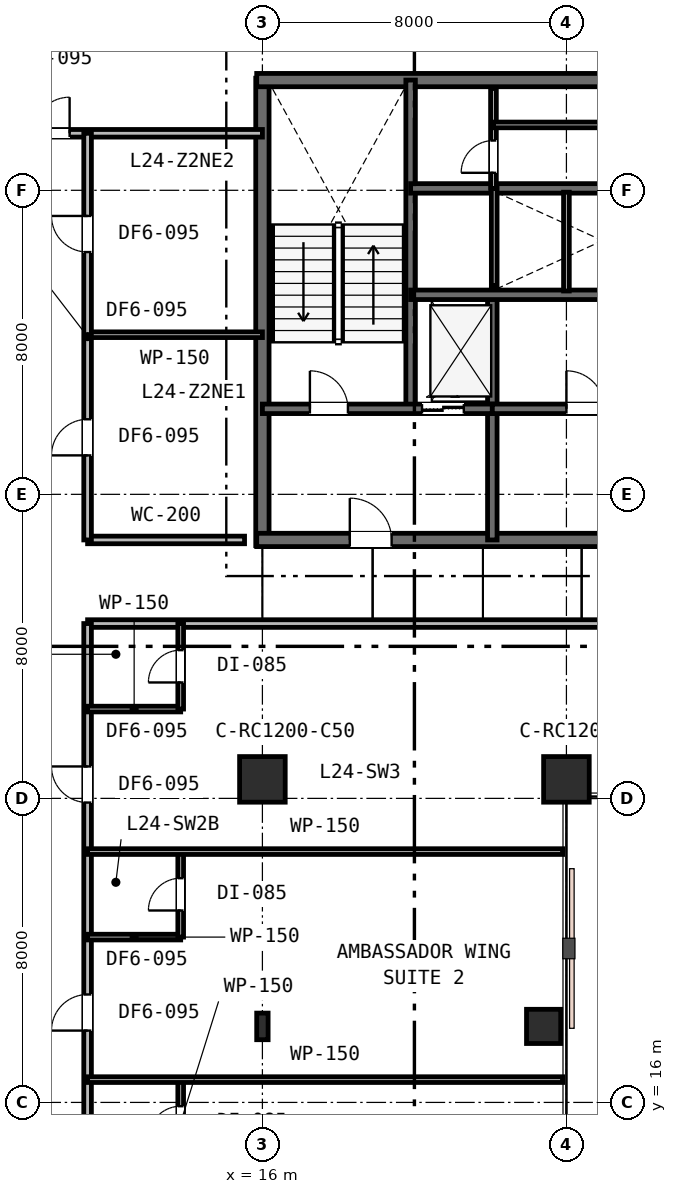
"""IFC4 building model, lengths in metres.
Left out: names, types, materials, properties, quantities, classifications, styles, units other than length and angle.
Written with IfcOpenShell. Run it as: python <this file> out.ifc"""

import sys

from ifc_helpers import new_model, si_unit, direction, frame, frame_2d, origin, origin_2d, place, context, subcontext, project, spatial, rectangle, i_section, extrude, element, fill, save


model = new_model("IFC4")
c1 = context("Model", 3, precision=1e-05, world=origin(), true_north=direction((0.0, 1.0)))
c2 = subcontext(c1, "Body", "Model", "MODEL_VIEW")
j1 = project(units=[si_unit("LENGTHUNIT", "METRE"), si_unit("PLANEANGLEUNIT", "RADIAN")], contexts=[c1])
p1 = place(None, origin())
s1 = spatial("IfcSite", under=j1, at=p1, CompositionType="ELEMENT")
p2 = place(p1, origin())
s2 = spatial("IfcBuilding", under=s1, at=p2, CompositionType="ELEMENT")
p3 = place(p2, frame((0.0, 0.0, 97.2)))
s3 = spatial("IfcBuildingStorey", under=s2, at=p3, CompositionType="ELEMENT", Elevation=97.2)
p4 = place(p3, frame((16.0, 30.65, 0.0), z_axis=(0.0, 0.0, 1.0), x_axis=(0.0, 1.0, 0.0)))
e1 = element("IfcWall", 1, at=p4, inside=s3, PredefinedType="SHEAR", context=c2, shape_type="SweptSolid", body=[
    extrude(rectangle(XDim=12.3, YDim=0.35, at=frame_2d((6.15, 0.0))), origin(), (0.0, 0.0, 1.0), 3.6),
])
p5 = place(p3, frame((15.85, 42.9, 0.0), z_axis=(0.0, 0.0, 1.0), x_axis=(1.0, 0.0, 0.0)))
e2 = element("IfcWall", 2, at=p5, inside=s3, PredefinedType="SHEAR", context=c2, shape_type="SweptSolid", body=[
    extrude(rectangle(XDim=24.3, YDim=0.35, at=frame_2d((12.15, 0.0))), origin(), (0.0, 0.0, 1.0), 3.6),
])
p6 = place(p3, frame((15.85, 30.8, 0.0), z_axis=(0.0, 0.0, 1.0), x_axis=(1.0, 0.0, 0.0)))
e3 = element("IfcWall", 3, at=p6, inside=s3, PredefinedType="SHEAR", context=c2, shape_type="SweptSolid", body=[
    extrude(rectangle(XDim=11.2, YDim=0.35, at=frame_2d((5.6, 0.0))), origin(), (0.0, 0.0, 1.0), 3.6),
])
p7 = place(p6, frame((2.45, 0.0, 0.0)))
e4 = element("IfcOpeningElement", 4, at=p7, cuts=e3, PredefinedType="OPENING", context=c2, shape_type="SweptSolid", body=[
    extrude(rectangle(XDim=1.1, YDim=2.15, at=frame_2d((0.55, 1.075))), frame((0.0, 0.185, 0.0), z_axis=(0.0, -1.0, 0.0), x_axis=(1.0, 0.0, 0.0)), (0.0, 0.0, 1.0), 0.37),
])
p8 = place(p3, frame((19.9, 34.25, 0.0), z_axis=(0.0, 0.0, 1.0), x_axis=(0.0, 1.0, 0.0)))
e5 = element("IfcWall", 5, at=p8, inside=s3, PredefinedType="SHEAR", context=c2, shape_type="SweptSolid", body=[
    extrude(rectangle(XDim=8.65, YDim=0.25, at=frame_2d((4.325, 0.0))), origin(), (0.0, 0.0, 1.0), 3.6),
])
p9 = place(p3, frame((22.05, 30.8, 0.0), z_axis=(0.0, 0.0, 1.0), x_axis=(0.0, 1.0, 0.0)))
e6 = element("IfcWall", 6, at=p9, inside=s3, PredefinedType="SHEAR", context=c2, shape_type="SweptSolid", body=[
    extrude(rectangle(XDim=6.45, YDim=0.25, at=frame_2d((3.225, 0.0))), origin(), (0.0, 0.0, 1.0), 3.6),
])
p10 = place(p3, frame((16.0, 34.25, 0.0), z_axis=(0.0, 0.0, 1.0), x_axis=(1.0, 0.0, 0.0)))
e7 = element("IfcWall", 7, at=p10, inside=s3, PredefinedType="SHEAR", context=c2, shape_type="SweptSolid", body=[
    extrude(rectangle(XDim=6.05, YDim=0.25, at=frame_2d((3.025, 0.0))), origin(), (0.0, 0.0, 1.0), 3.6),
])
p11 = place(p10, frame((1.25, 0.0, 0.0)))
e8 = element("IfcOpeningElement", 8, at=p11, cuts=e7, PredefinedType="OPENING", context=c2, shape_type="SweptSolid", body=[
    extrude(rectangle(XDim=1.0, YDim=2.15, at=frame_2d((0.5, 1.075))), frame((0.0, 0.135, 0.0), z_axis=(0.0, -1.0, 0.0), x_axis=(1.0, 0.0, 0.0)), (0.0, 0.0, 1.0), 0.27),
])
p12 = place(p10, frame((4.2, 0.0, 0.0)))
e9 = element("IfcOpeningElement", 9, at=p12, cuts=e7, PredefinedType="OPENING", context=c2, shape_type="SweptSolid", body=[
    extrude(rectangle(XDim=1.1, YDim=2.15, at=frame_2d((0.55, 1.075))), frame((0.0, 0.135, 0.0), z_axis=(0.0, -1.0, 0.0), x_axis=(1.0, 0.0, 0.0)), (0.0, 0.0, 1.0), 0.27),
])
p13 = place(p3, frame((22.05, 34.25, 0.0), z_axis=(0.0, 0.0, 1.0), x_axis=(1.0, 0.0, 0.0)))
e10 = element("IfcWall", 10, at=p13, inside=s3, PredefinedType="SHEAR", context=c2, shape_type="SweptSolid", body=[
    extrude(rectangle(XDim=5.0, YDim=0.25, at=frame_2d((2.5, 0.0))), origin(), (0.0, 0.0, 1.0), 3.6),
])
p14 = place(p13, frame((1.95, 0.0, 0.0)))
e11 = element("IfcOpeningElement", 11, at=p14, cuts=e10, PredefinedType="OPENING", context=c2, shape_type="SweptSolid", body=[
    extrude(rectangle(XDim=1.0, YDim=2.15, at=frame_2d((0.5, 1.075))), frame((0.0, 0.135, 0.0), z_axis=(0.0, -1.0, 0.0), x_axis=(1.0, 0.0, 0.0)), (0.0, 0.0, 1.0), 0.27),
])
p15 = place(p3, frame((19.9, 37.25, 0.0), z_axis=(0.0, 0.0, 1.0), x_axis=(1.0, 0.0, 0.0)))
e12 = element("IfcWall", 12, at=p15, inside=s3, PredefinedType="SHEAR", context=c2, shape_type="SweptSolid", body=[
    extrude(rectangle(XDim=16.2, YDim=0.25, at=frame_2d((8.1, 0.0))), origin(), (0.0, 0.0, 1.0), 3.6),
])
p16 = place(p15, frame((12.55, 0.0, 0.0)))
e13 = element("IfcOpeningElement", 13, at=p16, cuts=e12, PredefinedType="OPENING", context=c2, shape_type="SweptSolid", body=[
    extrude(rectangle(XDim=0.9, YDim=2.15, at=frame_2d((0.45, 1.075))), frame((0.0, 0.135, 0.0), z_axis=(0.0, -1.0, 0.0), x_axis=(1.0, 0.0, 0.0)), (0.0, 0.0, 1.0), 0.27),
])
p17 = place(p3, frame((19.9, 40.05, 0.0), z_axis=(0.0, 0.0, 1.0), x_axis=(1.0, 0.0, 0.0)))
e14 = element("IfcWall", 14, at=p17, inside=s3, PredefinedType="SHEAR", context=c2, shape_type="SweptSolid", body=[
    extrude(rectangle(XDim=12.05, YDim=0.25, at=frame_2d((6.025, 0.0))), origin(), (0.0, 0.0, 1.0), 3.6),
])
for number, where, z_axis, x_axis in (
    (15, (16.0, 24.5, 0.0), (0.0, 0.0, 1.0), (1.0, 0.0, 0.0)),
    (16, (24.0, 24.5, 0.0), (0.0, 0.0, 1.0), (1.0, 0.0, 0.0)),
):
    element("IfcColumn", number, at=place(p3, frame(where, z_axis=z_axis, x_axis=x_axis)), inside=s3, PredefinedType="COLUMN", context=c2, shape_type="SweptSolid", body=[
        extrude(rectangle(XDim=1.2, YDim=1.2, at=origin_2d()), origin(), (0.0, 0.0, 1.0), 3.6),
    ])
p18 = place(p3, frame((23.4, 18.0, 0.0), z_axis=(0.0, 0.0, 1.0), x_axis=(1.0, 0.0, 0.0)))
e17 = element("IfcColumn", 17, at=p18, inside=s3, PredefinedType="COLUMN", context=c2, shape_type="SweptSolid", body=[
    extrude(rectangle(XDim=0.9, YDim=0.9, at=origin_2d()), origin(), (0.0, 0.0, 1.0), 3.6),
])
p19 = place(p3, frame((16.0, 18.0, 0.0), z_axis=(0.0, 0.0, 1.0), x_axis=(1.0, 0.0, 0.0)))
e18 = element("IfcColumn", 18, at=p19, inside=s3, PredefinedType="COLUMN", context=c2, shape_type="SweptSolid", body=[
    extrude(i_section(OverallWidth=0.3, OverallDepth=0.7, WebThickness=0.017, FlangeThickness=0.032, FilletRadius=0.027, at=origin_2d()), origin(), (0.0, 0.0, 1.0), 3.6),
])
p20 = place(p3, frame((22.1, 37.49, 0.0), z_axis=(0.0, 0.0, 1.0), x_axis=(0.0, 1.0, 0.0)))
e19 = element("IfcWall", 19, at=p20, inside=s3, PredefinedType="PLUMBINGWALL", context=c2, shape_type="SweptSolid", body=[
    extrude(rectangle(XDim=2.56, YDim=0.15, at=frame_2d((1.28, 0.0))), origin(), (0.0, 0.0, 1.0), 3.33),
])
p21 = place(p3, frame((24.0, 37.35, 0.0), z_axis=(0.0, 0.0, 1.0), x_axis=(0.0, 1.0, 0.0)))
e20 = element("IfcWall", 20, at=p21, inside=s3, PredefinedType="PLUMBINGWALL", context=c2, shape_type="SweptSolid", body=[
    extrude(rectangle(XDim=2.6, YDim=0.15, at=frame_2d((1.3, 0.0))), origin(), (0.0, 0.0, 1.0), 3.33),
])
p22 = place(p3, frame((22.08, 40.05, 0.0), z_axis=(0.0, 0.0, 1.0), x_axis=(0.0, 1.0, 0.0)))
e21 = element("IfcWall", 21, at=p22, inside=s3, PredefinedType="PARTITIONING", context=c2, shape_type="SweptSolid", body=[
    extrude(rectangle(XDim=2.63, YDim=0.15, at=frame_2d((1.315, 0.0))), origin(), (0.0, 0.0, 1.0), 3.33),
])
p23 = place(p22, frame((0.41, 0.0, 0.0)))
e22 = element("IfcOpeningElement", 22, at=p23, cuts=e21, PredefinedType="OPENING", context=c2, shape_type="SweptSolid", body=[
    extrude(rectangle(XDim=0.85, YDim=2.15, at=frame_2d((0.425, 1.075))), frame((0.0, 0.085, 0.0), z_axis=(0.0, -1.0, 0.0), x_axis=(1.0, 0.0, 0.0)), (0.0, 0.0, 1.0), 0.17),
])
p24 = place(p3, frame((22.08, 41.72, 0.0), z_axis=(0.0, 0.0, 1.0), x_axis=(1.0, 0.0, 0.0)))
e23 = element("IfcWall", 23, at=p24, inside=s3, PredefinedType="PARTITIONING", context=c2, shape_type="SweptSolid", body=[
    extrude(rectangle(XDim=11.97, YDim=0.15, at=frame_2d((5.985, 0.0))), origin(), (0.0, 0.0, 1.0), 3.33),
])
p25 = place(p24, frame((5.535, 0.0, 0.0)))
e24 = element("IfcOpeningElement", 24, at=p25, cuts=e23, PredefinedType="OPENING", context=c2, shape_type="SweptSolid", body=[
    extrude(rectangle(XDim=0.9, YDim=2.15, at=frame_2d((0.45, 1.075))), frame((0.0, 0.085, 0.0), z_axis=(0.0, -1.0, 0.0), x_axis=(1.0, 0.0, 0.0)), (0.0, 0.0, 1.0), 0.17),
])
p26 = place(p3, frame((11.4, 28.6, 0.0), z_axis=(0.0, 0.0, 1.0), x_axis=(1.0, 0.0, 0.0)))
e25 = element("IfcWall", 25, at=p26, inside=s3, PredefinedType="PARTITIONING", context=c2, shape_type="SweptSolid", body=[
    extrude(rectangle(XDim=32.8, YDim=0.2, at=frame_2d((16.4, 0.0))), origin(), (0.0, 0.0, 1.0), 2.83),
])
p27 = place(p26, frame((14.7, 0.0, 0.0)))
e26 = element("IfcOpeningElement", 26, at=p27, cuts=e25, PredefinedType="OPENING", context=c2, shape_type="SweptSolid", body=[
    extrude(rectangle(XDim=0.95, YDim=2.15, at=frame_2d((0.475, 1.075))), frame((0.0, 0.11, 0.0), z_axis=(0.0, -1.0, 0.0), x_axis=(1.0, 0.0, 0.0)), (0.0, 0.0, 1.0), 0.22),
])
p28 = place(p26, frame((22.475, 0.0, 0.0)))
e27 = element("IfcOpeningElement", 27, at=p28, cuts=e25, PredefinedType="OPENING", context=c2, shape_type="SweptSolid", body=[
    extrude(rectangle(XDim=0.95, YDim=2.15, at=frame_2d((0.475, 1.075))), frame((0.0, 0.11, 0.0), z_axis=(0.0, -1.0, 0.0), x_axis=(1.0, 0.0, 0.0)), (0.0, 0.0, 1.0), 0.22),
])
p29 = place(p26, frame((28.985, 0.0, 0.0)))
e28 = element("IfcOpeningElement", 28, at=p29, cuts=e25, PredefinedType="OPENING", context=c2, shape_type="SweptSolid", body=[
    extrude(rectangle(XDim=0.95, YDim=2.15, at=frame_2d((0.475, 1.075))), frame((0.0, 0.11, 0.0), z_axis=(0.0, -1.0, 0.0), x_axis=(1.0, 0.0, 0.0)), (0.0, 0.0, 1.0), 0.22),
])
p30 = place(p3, frame((11.4, 30.8, 0.0), z_axis=(0.0, 0.0, 1.0), x_axis=(1.0, 0.0, 0.0)))
e29 = element("IfcWall", 29, at=p30, inside=s3, PredefinedType="PARTITIONING", context=c2, shape_type="SweptSolid", body=[
    extrude(rectangle(XDim=4.13, YDim=0.2, at=frame_2d((2.065, 0.0))), origin(), (0.0, 0.0, 1.0), 2.83),
])
p31 = place(p3, frame((0.1, 41.5, 0.0), z_axis=(0.0, 0.0, 1.0), x_axis=(1.0, 0.0, 0.0)))
e30 = element("IfcWall", 30, at=p31, inside=s3, PredefinedType="PARTITIONING", context=c2, shape_type="SweptSolid", body=[
    extrude(rectangle(XDim=15.9, YDim=0.2, at=frame_2d((7.95, 0.0))), origin(), (0.0, 0.0, 1.0), 2.83),
])
p32 = place(p31, frame((9.877, 0.0, 0.0)))
e31 = element("IfcOpeningElement", 31, at=p32, cuts=e30, PredefinedType="OPENING", context=c2, shape_type="SweptSolid", body=[
    extrude(rectangle(XDim=0.95, YDim=2.15, at=frame_2d((0.475, 1.075))), frame((0.0, 0.11, 0.0), z_axis=(0.0, -1.0, 0.0), x_axis=(1.0, 0.0, 0.0)), (0.0, 0.0, 1.0), 0.22),
])
p33 = place(p3, frame((11.4, 36.2, 0.0), z_axis=(0.0, 0.0, 1.0), x_axis=(1.0, 0.0, 0.0)))
e32 = element("IfcWall", 32, at=p33, inside=s3, PredefinedType="PARTITIONING", context=c2, shape_type="SweptSolid", body=[
    extrude(rectangle(XDim=4.6, YDim=0.15, at=frame_2d((2.3, 0.0))), origin(), (0.0, 0.0, 1.0), 3.33),
])
p34 = place(p3, frame((11.4, 30.8, 0.0), z_axis=(0.0, 0.0, 1.0), x_axis=(0.0, 1.0, 0.0)))
e33 = element("IfcWall", 33, at=p34, inside=s3, PredefinedType="PARTITIONING", context=c2, shape_type="SweptSolid", body=[
    extrude(rectangle(XDim=10.7, YDim=0.2, at=frame_2d((5.35, 0.0))), origin(), (0.0, 0.0, 1.0), 2.83),
])
p35 = place(p34, frame((2.225, 0.0, 0.0)))
e34 = element("IfcOpeningElement", 34, at=p35, cuts=e33, PredefinedType="OPENING", context=c2, shape_type="SweptSolid", body=[
    extrude(rectangle(XDim=0.95, YDim=2.15, at=frame_2d((0.475, 1.075))), frame((0.0, 0.11, 0.0), z_axis=(0.0, -1.0, 0.0), x_axis=(1.0, 0.0, 0.0)), (0.0, 0.0, 1.0), 0.22),
])
p36 = place(p34, frame((7.575, 0.0, 0.0)))
e35 = element("IfcOpeningElement", 35, at=p36, cuts=e33, PredefinedType="OPENING", context=c2, shape_type="SweptSolid", body=[
    extrude(rectangle(XDim=0.95, YDim=2.15, at=frame_2d((0.475, 1.075))), frame((0.0, 0.11, 0.0), z_axis=(0.0, -1.0, 0.0), x_axis=(1.0, 0.0, 0.0)), (0.0, 0.0, 1.0), 0.22),
])
p37 = place(p3, frame((11.4, 10.6, 0.0), z_axis=(0.0, 0.0, 1.0), x_axis=(0.0, 1.0, 0.0)))
e36 = element("IfcWall", 36, at=p37, inside=s3, PredefinedType="PARTITIONING", context=c2, shape_type="SweptSolid", body=[
    extrude(rectangle(XDim=18.0, YDim=0.2, at=frame_2d((9.0, 0.0))), origin(), (0.0, 0.0, 1.0), 2.83),
])
p38 = place(p37, frame((1.29, 0.0, 0.0)))
e37 = element("IfcOpeningElement", 37, at=p38, cuts=e36, PredefinedType="OPENING", context=c2, shape_type="SweptSolid", body=[
    extrude(rectangle(XDim=0.95, YDim=2.15, at=frame_2d((0.475, 1.075))), frame((0.0, 0.11, 0.0), z_axis=(0.0, -1.0, 0.0), x_axis=(1.0, 0.0, 0.0)), (0.0, 0.0, 1.0), 0.22),
])
p39 = place(p37, frame((7.29, 0.0, 0.0)))
e38 = element("IfcOpeningElement", 38, at=p39, cuts=e36, PredefinedType="OPENING", context=c2, shape_type="SweptSolid", body=[
    extrude(rectangle(XDim=0.95, YDim=2.15, at=frame_2d((0.475, 1.075))), frame((0.0, 0.11, 0.0), z_axis=(0.0, -1.0, 0.0), x_axis=(1.0, 0.0, 0.0)), (0.0, 0.0, 1.0), 0.22),
])
p40 = place(p37, frame((13.29, 0.0, 0.0)))
e39 = element("IfcOpeningElement", 39, at=p40, cuts=e36, PredefinedType="OPENING", context=c2, shape_type="SweptSolid", body=[
    extrude(rectangle(XDim=0.95, YDim=2.15, at=frame_2d((0.475, 1.075))), frame((0.0, 0.11, 0.0), z_axis=(0.0, -1.0, 0.0), x_axis=(1.0, 0.0, 0.0)), (0.0, 0.0, 1.0), 0.22),
])
p41 = place(p3, frame((13.85, 14.35, 0.0), z_axis=(0.0, 0.0, 1.0), x_axis=(0.0, 1.0, 0.0)))
e40 = element("IfcWall", 40, at=p41, inside=s3, PredefinedType="PARTITIONING", context=c2, shape_type="SweptSolid", body=[
    extrude(rectangle(XDim=2.25, YDim=0.15, at=frame_2d((1.125, 0.0))), origin(), (0.0, 0.0, 1.0), 3.02),
])
p42 = place(p41, frame((0.7, 0.0, 0.0)))
e41 = element("IfcOpeningElement", 41, at=p42, cuts=e40, PredefinedType="OPENING", context=c2, shape_type="SweptSolid", body=[
    extrude(rectangle(XDim=0.85, YDim=2.15, at=frame_2d((0.425, 1.075))), frame((0.0, 0.085, 0.0), z_axis=(0.0, -1.0, 0.0), x_axis=(1.0, 0.0, 0.0)), (0.0, 0.0, 1.0), 0.17),
])
p43 = place(p3, frame((11.4, 16.6, 0.0), z_axis=(0.0, 0.0, 1.0), x_axis=(1.0, 0.0, 0.0)))
e42 = element("IfcWall", 42, at=p43, inside=s3, PredefinedType="PARTITIONING", context=c2, shape_type="SweptSolid", body=[
    extrude(rectangle(XDim=12.5, YDim=0.15, at=frame_2d((6.25, 0.0))), origin(), (0.0, 0.0, 1.0), 2.83),
])
p44 = place(p3, frame((11.4, 20.35, 0.0), z_axis=(0.0, 0.0, 1.0), x_axis=(1.0, 0.0, 0.0)))
e43 = element("IfcWall", 43, at=p44, inside=s3, PredefinedType="PARTITIONING", context=c2, shape_type="SweptSolid", body=[
    extrude(rectangle(XDim=2.45, YDim=0.15, at=frame_2d((1.225, 0.0))), origin(), (0.0, 0.0, 1.0), 3.33),
])
p45 = place(p3, frame((13.85, 20.35, 0.0), z_axis=(0.0, 0.0, 1.0), x_axis=(0.0, 1.0, 0.0)))
e44 = element("IfcWall", 44, at=p45, inside=s3, PredefinedType="PARTITIONING", context=c2, shape_type="SweptSolid", body=[
    extrude(rectangle(XDim=2.25, YDim=0.15, at=frame_2d((1.125, 0.0))), origin(), (0.0, 0.0, 1.0), 3.33),
])
p46 = place(p45, frame((0.7, 0.0, 0.0)))
e45 = element("IfcOpeningElement", 45, at=p46, cuts=e44, PredefinedType="OPENING", context=c2, shape_type="SweptSolid", body=[
    extrude(rectangle(XDim=0.85, YDim=2.15, at=frame_2d((0.425, 1.075))), frame((0.0, 0.085, 0.0), z_axis=(0.0, -1.0, 0.0), x_axis=(1.0, 0.0, 0.0)), (0.0, 0.0, 1.0), 0.17),
])
p47 = place(p3, frame((11.4, 22.6, 0.0), z_axis=(0.0, 0.0, 1.0), x_axis=(1.0, 0.0, 0.0)))
e46 = element("IfcWall", 46, at=p47, inside=s3, PredefinedType="PARTITIONING", context=c2, shape_type="SweptSolid", body=[
    extrude(rectangle(XDim=12.5, YDim=0.15, at=frame_2d((6.25, 0.0))), origin(), (0.0, 0.0, 1.0), 2.83),
])
p48 = place(p3, frame((11.4, 26.35, 0.0), z_axis=(0.0, 0.0, 1.0), x_axis=(1.0, 0.0, 0.0)))
e47 = element("IfcWall", 47, at=p48, inside=s3, PredefinedType="PARTITIONING", context=c2, shape_type="SweptSolid", body=[
    extrude(rectangle(XDim=2.45, YDim=0.15, at=frame_2d((1.225, 0.0))), origin(), (0.0, 0.0, 1.0), 3.33),
])
p49 = place(p3, frame((13.85, 26.35, 0.0), z_axis=(0.0, 0.0, 1.0), x_axis=(0.0, 1.0, 0.0)))
e48 = element("IfcWall", 48, at=p49, inside=s3, PredefinedType="PARTITIONING", context=c2, shape_type="SweptSolid", body=[
    extrude(rectangle(XDim=2.25, YDim=0.15, at=frame_2d((1.125, 0.0))), origin(), (0.0, 0.0, 1.0), 3.33),
])
p50 = place(p49, frame((0.7, 0.0, 0.0)))
e49 = element("IfcOpeningElement", 49, at=p50, cuts=e48, PredefinedType="OPENING", context=c2, shape_type="SweptSolid", body=[
    extrude(rectangle(XDim=0.85, YDim=2.15, at=frame_2d((0.425, 1.075))), frame((0.0, 0.085, 0.0), z_axis=(0.0, -1.0, 0.0), x_axis=(1.0, 0.0, 0.0)), (0.0, 0.0, 1.0), 0.17),
])
p51 = place(p11, origin())
e50 = element("IfcDoor", 50, at=p51, inside=s3, OperationType="SINGLE_SWING_LEFT", PredefinedType="DOOR", context=c2, shape_type="SweptSolid", body=[
    extrude(rectangle(XDim=1.0, YDim=2.15, at=frame_2d((0.5, 1.075))), frame((0.0, 0.025, 0.0), z_axis=(0.0, -1.0, 0.0), x_axis=(1.0, 0.0, 0.0)), (0.0, 0.0, 1.0), 0.05),
])
fill(e8, e50)
p52 = place(p7, origin())
e51 = element("IfcDoor", 51, at=p52, inside=s3, OperationType="SINGLE_SWING_LEFT", PredefinedType="DOOR", context=c2, shape_type="SweptSolid", body=[
    extrude(rectangle(XDim=1.1, YDim=2.15, at=frame_2d((0.55, 1.075))), frame((0.0, 0.025, 0.0), z_axis=(0.0, -1.0, 0.0), x_axis=(1.0, 0.0, 0.0)), (0.0, 0.0, 1.0), 0.05),
])
fill(e4, e51)
p53 = place(p14, origin())
e52 = element("IfcDoor", 52, at=p53, inside=s3, OperationType="SINGLE_SWING_LEFT", PredefinedType="DOOR", context=c2, shape_type="SweptSolid", body=[
    extrude(rectangle(XDim=1.0, YDim=2.15, at=frame_2d((0.5, 1.075))), frame((0.0, 0.025, 0.0), z_axis=(0.0, -1.0, 0.0), x_axis=(1.0, 0.0, 0.0)), (0.0, 0.0, 1.0), 0.05),
])
fill(e11, e52)
p54 = place(p23, origin())
e53 = element("IfcDoor", 53, at=p54, inside=s3, OperationType="SINGLE_SWING_LEFT", PredefinedType="DOOR", context=c2, shape_type="SweptSolid", body=[
    extrude(rectangle(XDim=0.85, YDim=2.15, at=frame_2d((0.425, 1.075))), frame((0.0, 0.025, 0.0), z_axis=(0.0, -1.0, 0.0), x_axis=(1.0, 0.0, 0.0)), (0.0, 0.0, 1.0), 0.05),
])
fill(e22, e53)
p55 = place(p32, origin())
e54 = element("IfcDoor", 54, at=p55, inside=s3, OperationType="SINGLE_SWING_RIGHT", PredefinedType="DOOR", context=c2, shape_type="SweptSolid", body=[
    extrude(rectangle(XDim=0.95, YDim=2.15, at=frame_2d((0.475, 1.075))), frame((0.0, 0.025, 0.0), z_axis=(0.0, -1.0, 0.0), x_axis=(1.0, 0.0, 0.0)), (0.0, 0.0, 1.0), 0.05),
])
fill(e31, e54)
p56 = place(p35, origin())
e55 = element("IfcDoor", 55, at=p56, inside=s3, OperationType="SINGLE_SWING_LEFT", PredefinedType="DOOR", context=c2, shape_type="SweptSolid", body=[
    extrude(rectangle(XDim=0.95, YDim=2.15, at=frame_2d((0.475, 1.075))), frame((0.0, 0.025, 0.0), z_axis=(0.0, -1.0, 0.0), x_axis=(1.0, 0.0, 0.0)), (0.0, 0.0, 1.0), 0.05),
])
fill(e34, e55)
p57 = place(p36, origin())
e56 = element("IfcDoor", 56, at=p57, inside=s3, OperationType="SINGLE_SWING_RIGHT", PredefinedType="DOOR", context=c2, shape_type="SweptSolid", body=[
    extrude(rectangle(XDim=0.95, YDim=2.15, at=frame_2d((0.475, 1.075))), frame((0.0, 0.025, 0.0), z_axis=(0.0, -1.0, 0.0), x_axis=(1.0, 0.0, 0.0)), (0.0, 0.0, 1.0), 0.05),
])
fill(e35, e56)
p58 = place(p42, origin())
e57 = element("IfcDoor", 57, at=p58, inside=s3, OperationType="SINGLE_SWING_LEFT", PredefinedType="DOOR", context=c2, shape_type="SweptSolid", body=[
    extrude(rectangle(XDim=0.85, YDim=2.15, at=frame_2d((0.425, 1.075))), frame((0.0, 0.025, 0.0), z_axis=(0.0, -1.0, 0.0), x_axis=(1.0, 0.0, 0.0)), (0.0, 0.0, 1.0), 0.05),
])
fill(e41, e57)
p59 = place(p39, origin())
e58 = element("IfcDoor", 58, at=p59, inside=s3, OperationType="SINGLE_SWING_LEFT", PredefinedType="DOOR", context=c2, shape_type="SweptSolid", body=[
    extrude(rectangle(XDim=0.95, YDim=2.15, at=frame_2d((0.475, 1.075))), frame((0.0, 0.025, 0.0), z_axis=(0.0, -1.0, 0.0), x_axis=(1.0, 0.0, 0.0)), (0.0, 0.0, 1.0), 0.05),
])
fill(e38, e58)
p60 = place(p46, origin())
e59 = element("IfcDoor", 59, at=p60, inside=s3, OperationType="SINGLE_SWING_LEFT", PredefinedType="DOOR", context=c2, shape_type="SweptSolid", body=[
    extrude(rectangle(XDim=0.85, YDim=2.15, at=frame_2d((0.425, 1.075))), frame((0.0, 0.025, 0.0), z_axis=(0.0, -1.0, 0.0), x_axis=(1.0, 0.0, 0.0)), (0.0, 0.0, 1.0), 0.05),
])
fill(e45, e59)
p61 = place(p40, origin())
e60 = element("IfcDoor", 60, at=p61, inside=s3, OperationType="SINGLE_SWING_RIGHT", PredefinedType="DOOR", context=c2, shape_type="SweptSolid", body=[
    extrude(rectangle(XDim=0.95, YDim=2.15, at=frame_2d((0.475, 1.075))), frame((0.0, 0.025, 0.0), z_axis=(0.0, -1.0, 0.0), x_axis=(1.0, 0.0, 0.0)), (0.0, 0.0, 1.0), 0.05),
])
fill(e39, e60)
p62 = place(p50, origin())
e61 = element("IfcDoor", 61, at=p62, inside=s3, OperationType="SINGLE_SWING_LEFT", PredefinedType="DOOR", context=c2, shape_type="SweptSolid", body=[
    extrude(rectangle(XDim=0.85, YDim=2.15, at=frame_2d((0.425, 1.075))), frame((0.0, 0.025, 0.0), z_axis=(0.0, -1.0, 0.0), x_axis=(1.0, 0.0, 0.0)), (0.0, 0.0, 1.0), 0.05),
])
fill(e49, e61)
p63 = place(p12, origin())
e62 = element("IfcDoor", 62, at=p63, inside=s3, OperationType="DOUBLE_DOOR_SLIDING", PredefinedType="DOOR", context=c2, shape_type="SweptSolid", body=[
    extrude(rectangle(XDim=1.1, YDim=2.15, at=frame_2d((0.55, 1.075))), frame((0.0, 0.025, 0.0), z_axis=(0.0, -1.0, 0.0), x_axis=(1.0, 0.0, 0.0)), (0.0, 0.0, 1.0), 0.05),
])
fill(e9, e62)
save(model, sys.argv[1])
